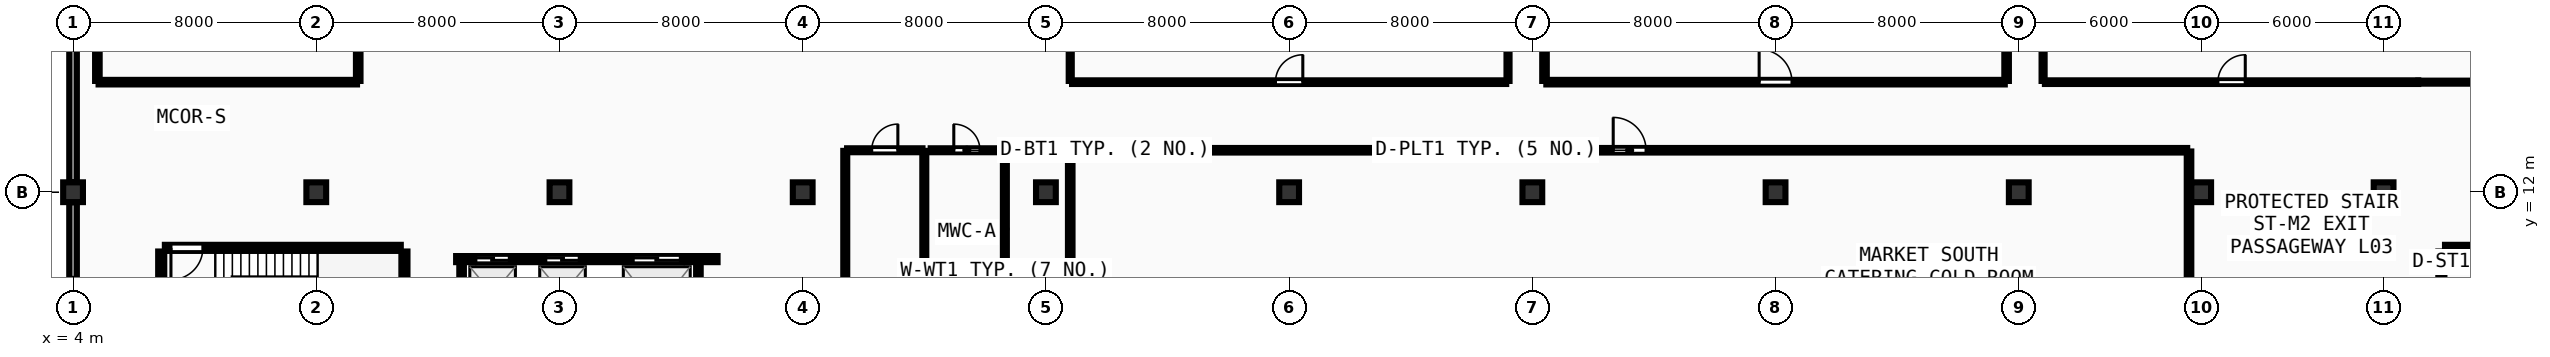
"""IFC4 building model, lengths in metres.
Left out: names, types, materials, properties, quantities, classifications, styles, units other than length and angle.
Written with IfcOpenShell. Run it as: python <this file> out.ifc"""

import sys

from ifc_helpers import new_model, si_unit, direction, frame, frame_2d, origin, origin_2d, place, context, subcontext, project, spatial, rectangle, extrude, element, fill, save


model = new_model("IFC4")
c1 = context("Model", 3, precision=1e-05, world=origin(), true_north=direction((0.0, 1.0)))
c2 = subcontext(c1, "Body", "Model", "MODEL_VIEW")
j1 = project(units=[si_unit("LENGTHUNIT", "METRE"), si_unit("PLANEANGLEUNIT", "RADIAN")], contexts=[c1])
p1 = place(None, origin())
s1 = spatial("IfcSite", under=j1, at=p1, CompositionType="ELEMENT")
p2 = place(p1, origin())
s2 = spatial("IfcBuilding", under=s1, at=p2, CompositionType="ELEMENT")
p3 = place(p2, frame((0.0, 0.0, 13.5)))
s3 = spatial("IfcBuildingStorey", under=s2, at=p3, CompositionType="ELEMENT", Elevation=13.5)
for number, where, z_axis, x_axis in (
    (1, (4.0, 12.0, 0.0), (0.0, 0.0, 1.0), (1.0, 0.0, 0.0)),
    (2, (12.0, 12.0, 0.0), (0.0, 0.0, 1.0), (1.0, 0.0, 0.0)),
    (3, (20.0, 12.0, 0.0), (0.0, 0.0, 1.0), (1.0, 0.0, 0.0)),
    (4, (28.0, 12.0, 0.0), (0.0, 0.0, 1.0), (1.0, 0.0, 0.0)),
    (5, (36.0, 12.0, 0.0), (0.0, 0.0, 1.0), (1.0, 0.0, 0.0)),
    (6, (44.0, 12.0, 0.0), (0.0, 0.0, 1.0), (1.0, 0.0, 0.0)),
    (7, (52.0, 12.0, 0.0), (0.0, 0.0, 1.0), (1.0, 0.0, 0.0)),
    (8, (60.0, 12.0, 0.0), (0.0, 0.0, 1.0), (1.0, 0.0, 0.0)),
    (9, (68.0, 12.0, 0.0), (0.0, 0.0, 1.0), (1.0, 0.0, 0.0)),
    (10, (74.0, 12.0, 0.0), (0.0, 0.0, 1.0), (1.0, 0.0, 0.0)),
    (11, (80.0, 12.0, 0.0), (0.0, 0.0, 1.0), (1.0, 0.0, 0.0)),
):
    element("IfcColumn", number, at=place(p3, frame(where, z_axis=z_axis, x_axis=x_axis)), inside=s3, PredefinedType="COLUMN", context=c2, shape_type="SweptSolid", body=[
        extrude(rectangle(XDim=0.65, YDim=0.65, at=origin_2d()), origin(), (0.0, 0.0, 1.0), 4.5),
    ])
p4 = place(p3, frame((4.0, 19.67, 0.0), z_axis=(0.0, 0.0, 1.0), x_axis=(0.0, -1.0, 0.0)))
e12 = element("IfcWall", 12, at=p4, inside=s3, PredefinedType="SOLIDWALL", context=c2, shape_type="SweptSolid", body=[
    extrude(rectangle(XDim=7.34, YDim=0.25, at=frame_2d((3.67, 0.0))), origin(), (0.0, 0.0, 1.0), 3.42),
])
p5 = place(p3, frame((4.0, 11.67, 0.0), z_axis=(0.0, 0.0, 1.0), x_axis=(0.0, -1.0, 0.0)))
e13 = element("IfcWall", 13, at=p5, inside=s3, PredefinedType="SOLIDWALL", context=c2, shape_type="SweptSolid", body=[
    extrude(rectangle(XDim=7.34, YDim=0.25, at=frame_2d((3.67, 0.0))), origin(), (0.0, 0.0, 1.0), 3.42),
])
p6 = place(p5, frame((2.47, 0.0, 0.95)))
e14 = element("IfcOpeningElement", 14, at=p6, cuts=e13, PredefinedType="OPENING", context=c2, shape_type="SweptSolid", body=[
    extrude(rectangle(XDim=2.4, YDim=1.65, at=frame_2d((1.2, 0.825))), frame((0.0, 0.135, 0.0), z_axis=(0.0, -1.0, 0.0), x_axis=(1.0, 0.0, 0.0)), (0.0, 0.0, 1.0), 0.27),
])
p7 = place(p3, frame((14.9, 6.58, 0.0), z_axis=(0.0, 0.0, 1.0), x_axis=(0.0, 1.0, 0.0)))
e15 = element("IfcWall", 15, at=p7, inside=s3, PredefinedType="SHEAR", context=c2, shape_type="SweptSolid", body=[
    extrude(rectangle(XDim=3.47, YDim=0.2, at=frame_2d((1.735, 0.0))), origin(), (0.0, 0.0, 1.0), 4.24),
])
p8 = place(p3, frame((14.78, 10.17, 0.0), z_axis=(0.0, 0.0, 1.0), x_axis=(-1.0, 0.0, 0.0)))
e16 = element("IfcWall", 16, at=p8, inside=s3, PredefinedType="SHEAR", context=c2, shape_type="SweptSolid", body=[
    extrude(rectangle(XDim=7.76, YDim=0.2, at=frame_2d((3.88, 0.0))), origin(), (0.0, 0.0, 1.0), 4.24),
])
p9 = place(p8, frame((6.51, 0.0, 0.0)))
e17 = element("IfcOpeningElement", 17, at=p9, cuts=e16, PredefinedType="OPENING", context=c2, shape_type="SweptSolid", body=[
    extrude(rectangle(XDim=1.05, YDim=2.1, at=frame_2d((0.525, 1.05))), frame((0.0, 0.11, 0.0), z_axis=(0.0, -1.0, 0.0), x_axis=(1.0, 0.0, 0.0)), (0.0, 0.0, 1.0), 0.22),
])
p10 = place(p3, frame((6.9, 10.05, 0.0), z_axis=(0.0, 0.0, 1.0), x_axis=(0.0, -1.0, 0.0)))
e18 = element("IfcWall", 18, at=p10, inside=s3, PredefinedType="SHEAR", context=c2, shape_type="SweptSolid", body=[
    extrude(rectangle(XDim=3.47, YDim=0.2, at=frame_2d((1.735, 0.0))), origin(), (0.0, 0.0, 1.0), 4.24),
])
p11 = place(p3, frame((89.78, 10.17, 0.0), z_axis=(0.0, 0.0, 1.0), x_axis=(-1.0, 0.0, 0.0)))
e19 = element("IfcWall", 19, at=p11, inside=s3, PredefinedType="SHEAR", context=c2, shape_type="SweptSolid", body=[
    extrude(rectangle(XDim=7.76, YDim=0.2, at=frame_2d((3.88, 0.0))), origin(), (0.0, 0.0, 1.0), 4.24),
])
p12 = place(p3, frame((81.9, 10.05, 0.0), z_axis=(0.0, 0.0, 1.0), x_axis=(0.0, -1.0, 0.0)))
e20 = element("IfcWall", 20, at=p12, inside=s3, PredefinedType="SHEAR", context=c2, shape_type="SweptSolid", body=[
    extrude(rectangle(XDim=3.47, YDim=0.2, at=frame_2d((1.735, 0.0))), origin(), (0.0, 0.0, 1.0), 4.24),
])
p13 = place(p12, frame((1.21, 0.0, 0.0)))
e21 = element("IfcOpeningElement", 21, at=p13, cuts=e20, PredefinedType="OPENING", context=c2, shape_type="SweptSolid", body=[
    extrude(rectangle(XDim=1.05, YDim=2.1, at=frame_2d((0.525, 1.05))), frame((0.0, 0.11, 0.0), z_axis=(0.0, -1.0, 0.0), x_axis=(1.0, 0.0, 0.0)), (0.0, 0.0, 1.0), 0.22),
])
p14 = place(p3, frame((16.6, 9.8, 0.0), z_axis=(0.0, 0.0, 1.0), x_axis=(1.0, 0.0, 0.0)))
e22 = element("IfcWall", 22, at=p14, inside=s3, PredefinedType="SOLIDWALL", context=c2, shape_type="SweptSolid", body=[
    extrude(rectangle(XDim=8.6, YDim=0.2, at=frame_2d((4.3, 0.0))), origin(), (0.0, 0.0, 1.0), 3.425),
])
p15 = place(p14, frame((0.65, 0.0, 0.0)))
e23 = element("IfcOpeningElement", 23, at=p15, cuts=e22, PredefinedType="OPENING", context=c2, shape_type="SweptSolid", body=[
    extrude(rectangle(XDim=1.1, YDim=2.1, at=frame_2d((0.55, 1.05))), frame((0.0, 0.11, 0.0), z_axis=(0.0, -1.0, 0.0), x_axis=(1.0, 0.0, 0.0)), (0.0, 0.0, 1.0), 0.22),
])
p16 = place(p14, frame((2.95, 0.0, 0.0)))
e24 = element("IfcOpeningElement", 24, at=p16, cuts=e22, PredefinedType="OPENING", context=c2, shape_type="SweptSolid", body=[
    extrude(rectangle(XDim=1.1, YDim=2.1, at=frame_2d((0.55, 1.05))), frame((0.0, 0.11, 0.0), z_axis=(0.0, -1.0, 0.0), x_axis=(1.0, 0.0, 0.0)), (0.0, 0.0, 1.0), 0.22),
])
p17 = place(p14, frame((5.825, 0.0, 0.0)))
e25 = element("IfcOpeningElement", 25, at=p17, cuts=e22, PredefinedType="OPENING", context=c2, shape_type="SweptSolid", body=[
    extrude(rectangle(XDim=1.55, YDim=2.2, at=frame_2d((0.775, 1.1))), frame((0.0, 0.11, 0.0), z_axis=(0.0, -1.0, 0.0), x_axis=(1.0, 0.0, 0.0)), (0.0, 0.0, 1.0), 0.22),
])
for number, where, z_axis, x_axis in (
    (26, (16.78, 6.76, 0.0), (0.0, 0.0, 1.0), (0.0, 1.0, 0.0)),
    (27, (24.57, 6.76, 0.0), (0.0, 0.0, 1.0), (0.0, 1.0, 0.0)),
):
    element("IfcWall", number, at=place(p3, frame(where, z_axis=z_axis, x_axis=x_axis)), inside=s3, PredefinedType="PARTITIONING", context=c2, shape_type="SweptSolid", body=[
        extrude(rectangle(XDim=2.91, YDim=0.15, at=frame_2d((1.455, 0.0))), origin(), (0.0, 0.0, 1.0), 4.23),
    ])
p18 = place(p3, frame((29.46, 13.38, 0.0), z_axis=(0.0, 0.0, 1.0), x_axis=(1.0, 0.0, 0.0)))
e28 = element("IfcWall", 28, at=p18, inside=s3, PredefinedType="PLUMBINGWALL", context=c2, shape_type="SweptSolid", body=[
    extrude(rectangle(XDim=2.48, YDim=0.13, at=frame_2d((1.24, 0.0))), origin(), (0.0, 0.0, 1.0), 4.09),
])
p19 = place(p18, frame((0.81, 0.0, 0.0)))
e29 = element("IfcOpeningElement", 29, at=p19, cuts=e28, PredefinedType="OPENING", context=c2, shape_type="SweptSolid", body=[
    extrude(rectangle(XDim=0.86, YDim=2.05, at=frame_2d((0.43, 1.025))), frame((0.0, 0.075, 0.0), z_axis=(0.0, -1.0, 0.0), x_axis=(1.0, 0.0, 0.0)), (0.0, 0.0, 1.0), 0.15),
])
p20 = place(p3, frame((32.21, 13.38, 0.0), z_axis=(0.0, 0.0, 1.0), x_axis=(1.0, 0.0, 0.0)))
e30 = element("IfcWall", 30, at=p20, inside=s3, PredefinedType="PLUMBINGWALL", context=c2, shape_type="SweptSolid", body=[
    extrude(rectangle(XDim=2.38, YDim=0.13, at=frame_2d((1.19, 0.0))), origin(), (0.0, 0.0, 1.0), 4.09),
])
p21 = place(p20, frame((0.76, 0.0, 0.0)))
e31 = element("IfcOpeningElement", 31, at=p21, cuts=e30, PredefinedType="OPENING", context=c2, shape_type="SweptSolid", body=[
    extrude(rectangle(XDim=0.86, YDim=2.05, at=frame_2d((0.43, 1.025))), frame((0.0, 0.075, 0.0), z_axis=(0.0, -1.0, 0.0), x_axis=(1.0, 0.0, 0.0)), (0.0, 0.0, 1.0), 0.15),
])
p22 = place(p3, frame((36.86, 15.62, 0.0), z_axis=(0.0, 0.0, 1.0), x_axis=(1.0, 0.0, 0.0)))
e32 = element("IfcWall", 32, at=p22, inside=s3, PredefinedType="PARTITIONING", context=c2, shape_type="SweptSolid", body=[
    extrude(rectangle(XDim=14.28, YDim=0.12, at=frame_2d((7.14, 0.0))), origin(), (0.0, 0.0, 1.0), 3.425),
])
p23 = place(p22, frame((6.69, 0.0, 0.0)))
e33 = element("IfcOpeningElement", 33, at=p23, cuts=e32, PredefinedType="OPENING", context=c2, shape_type="SweptSolid", body=[
    extrude(rectangle(XDim=0.9, YDim=2.08, at=frame_2d((0.45, 1.04))), frame((0.0, 0.07, 0.0), z_axis=(0.0, -1.0, 0.0), x_axis=(1.0, 0.0, 0.0)), (0.0, 0.0, 1.0), 0.14),
])
p24 = place(p3, frame((52.46, 15.62, 0.0), z_axis=(0.0, 0.0, 1.0), x_axis=(1.0, 0.0, 0.0)))
e34 = element("IfcWall", 34, at=p24, inside=s3, PredefinedType="PARTITIONING", context=c2, shape_type="SweptSolid", body=[
    extrude(rectangle(XDim=15.08, YDim=0.15, at=frame_2d((7.54, 0.0))), origin(), (0.0, 0.0, 1.0), 3.425),
])
p25 = place(p24, frame((7.0, 0.0, 0.0)))
e35 = element("IfcOpeningElement", 35, at=p25, cuts=e34, PredefinedType="OPENING", context=c2, shape_type="SweptSolid", body=[
    extrude(rectangle(XDim=1.08, YDim=2.1, at=frame_2d((0.54, 1.05))), frame((0.0, 0.085, 0.0), z_axis=(0.0, -1.0, 0.0), x_axis=(1.0, 0.0, 0.0)), (0.0, 0.0, 1.0), 0.17),
])
p26 = place(p3, frame((68.86, 15.62, 0.0), z_axis=(0.0, 0.0, 1.0), x_axis=(1.0, 0.0, 0.0)))
e36 = element("IfcWall", 36, at=p26, inside=s3, PredefinedType="PARTITIONING", context=c2, shape_type="SweptSolid", body=[
    extrude(rectangle(XDim=12.28, YDim=0.12, at=frame_2d((6.14, 0.0))), origin(), (0.0, 0.0, 1.0), 3.425),
])
p27 = place(p26, frame((5.69, 0.0, 0.0)))
e37 = element("IfcOpeningElement", 37, at=p27, cuts=e36, PredefinedType="OPENING", context=c2, shape_type="SweptSolid", body=[
    extrude(rectangle(XDim=0.9, YDim=2.08, at=frame_2d((0.45, 1.04))), frame((0.0, 0.07, 0.0), z_axis=(0.0, -1.0, 0.0), x_axis=(1.0, 0.0, 0.0)), (0.0, 0.0, 1.0), 0.14),
])
p28 = place(p3, frame((36.86, 13.38, 0.0), z_axis=(0.0, 0.0, 1.0), x_axis=(1.0, 0.0, 0.0)))
e38 = element("IfcWall", 38, at=p28, inside=s3, PredefinedType="PARTITIONING", context=c2, shape_type="SweptSolid", body=[
    extrude(rectangle(XDim=36.68, YDim=0.15, at=frame_2d((18.34, 0.0))), origin(), (0.0, 0.0, 1.0), 3.425),
])
p29 = place(p28, frame((17.8, 0.0, 0.0)))
e39 = element("IfcOpeningElement", 39, at=p29, cuts=e38, PredefinedType="OPENING", context=c2, shape_type="SweptSolid", body=[
    extrude(rectangle(XDim=1.08, YDim=2.1, at=frame_2d((0.54, 1.05))), frame((0.0, 0.085, 0.0), z_axis=(0.0, -1.0, 0.0), x_axis=(1.0, 0.0, 0.0)), (0.0, 0.0, 1.0), 0.17),
])
for number, where, z_axis, x_axis in (
    (40, (32.0, 5.22, 0.0), (0.0, 0.0, 1.0), (0.0, 1.0, 0.0)),
    (41, (29.4, 13.36, 0.0), (0.0, 0.0, 1.0), (0.0, -1.0, 0.0)),
):
    element("IfcWall", number, at=place(p3, frame(where, z_axis=z_axis, x_axis=x_axis)), inside=s3, PredefinedType="PLUMBINGWALL", context=c2, shape_type="SweptSolid", body=[
        extrude(rectangle(XDim=8.14, YDim=0.13, at=frame_2d((4.07, 0.0))), origin(), (0.0, 0.0, 1.0), 3.425),
    ])
p30 = place(p3, frame((34.65, 8.22, 0.0), z_axis=(0.0, 0.0, 1.0), x_axis=(0.0, 1.0, 0.0)))
e42 = element("IfcWall", 42, at=p30, inside=s3, PredefinedType="PLUMBINGWALL", context=c2, shape_type="SweptSolid", body=[
    extrude(rectangle(XDim=5.14, YDim=0.13, at=frame_2d((2.57, 0.0))), origin(), (0.0, 0.0, 1.0), 3.425),
])
for number, where, z_axis, x_axis in (
    (43, (51.2, 15.66, 0.0), (0.0, 0.0, 1.0), (0.0, 1.0, 0.0)),
    (44, (36.8, 25.16, 0.0), (0.0, 0.0, 1.0), (0.0, -1.0, 0.0)),
):
    element("IfcWall", number, at=place(p3, frame(where, z_axis=z_axis, x_axis=x_axis)), inside=s3, PredefinedType="PARTITIONING", context=c2, shape_type="SweptSolid", body=[
        extrude(rectangle(XDim=9.5, YDim=0.1, at=frame_2d((4.75, 0.0))), origin(), (0.0, 0.0, 1.0), 3.425),
    ])
for number, where, z_axis, x_axis in (
    (45, (67.6, 15.66, 0.0), (0.0, 0.0, 1.0), (0.0, 1.0, 0.0)),
    (46, (52.4, 25.16, 0.0), (0.0, 0.0, 1.0), (0.0, -1.0, 0.0)),
):
    element("IfcWall", number, at=place(p3, frame(where, z_axis=z_axis, x_axis=x_axis)), inside=s3, PredefinedType="PARTITIONING", context=c2, shape_type="SweptSolid", body=[
        extrude(rectangle(XDim=9.5, YDim=0.15, at=frame_2d((4.75, 0.0))), origin(), (0.0, 0.0, 1.0), 3.425),
    ])
p31 = place(p3, frame((81.14, 15.62, 0.0), z_axis=(0.0, 0.0, 1.0), x_axis=(1.0, 0.0, 0.0)))
e47 = element("IfcWall", 47, at=p31, inside=s3, PredefinedType="PARTITIONING", context=c2, shape_type="SweptSolid", body=[
    extrude(rectangle(XDim=14.02, YDim=0.1, at=frame_2d((7.01, 0.0))), origin(), (0.0, 0.0, 1.0), 3.425),
])
p32 = place(p3, frame((68.8, 25.16, 0.0), z_axis=(0.0, 0.0, 1.0), x_axis=(0.0, -1.0, 0.0)))
e48 = element("IfcWall", 48, at=p32, inside=s3, PredefinedType="PARTITIONING", context=c2, shape_type="SweptSolid", body=[
    extrude(rectangle(XDim=9.5, YDim=0.1, at=frame_2d((4.75, 0.0))), origin(), (0.0, 0.0, 1.0), 3.425),
])
for number, where, z_axis, x_axis in (
    (49, (73.6, 4.84, 0.0), (0.0, 0.0, 1.0), (0.0, 1.0, 0.0)),
    (50, (36.8, 13.34, 0.0), (0.0, 0.0, 1.0), (0.0, -1.0, 0.0)),
    (51, (4.84, 15.62, 0.0), (0.0, 0.0, 1.0), (1.0, 0.0, 0.0)),
):
    element("IfcWall", number, at=place(p3, frame(where, z_axis=z_axis, x_axis=x_axis)), inside=s3, PredefinedType="PARTITIONING", context=c2, shape_type="SweptSolid", body=[
        extrude(rectangle(XDim=8.5, YDim=0.15, at=frame_2d((4.25, 0.0))), origin(), (0.0, 0.0, 1.0), 3.425),
    ])
p33 = place(p3, frame((13.38, 15.66, 0.0), z_axis=(0.0, 0.0, 1.0), x_axis=(0.0, 1.0, 0.0)))
e52 = element("IfcWall", 52, at=p33, inside=s3, PredefinedType="PARTITIONING", context=c2, shape_type="SweptSolid", body=[
    extrude(rectangle(XDim=5.8, YDim=0.15, at=frame_2d((2.9, 0.0))), origin(), (0.0, 0.0, 1.0), 3.425),
])
p34 = place(p3, frame((4.8, 65.16, 0.0), z_axis=(0.0, 0.0, 1.0), x_axis=(0.0, -1.0, 0.0)))
e53 = element("IfcWall", 53, at=p34, inside=s3, PredefinedType="PARTITIONING", context=c2, shape_type="SweptSolid", body=[
    extrude(rectangle(XDim=49.5, YDim=0.15, at=frame_2d((24.75, 0.0))), origin(), (0.0, 0.0, 1.0), 3.425),
])
p35 = place(p9, origin())
e54 = element("IfcDoor", 54, at=p35, inside=s3, OperationType="SINGLE_SWING_RIGHT", PredefinedType="DOOR", context=c2, shape_type="SweptSolid", body=[
    extrude(rectangle(XDim=1.05, YDim=2.1, at=frame_2d((0.525, 1.05))), frame((0.0, 0.025, 0.0), z_axis=(0.0, -1.0, 0.0), x_axis=(1.0, 0.0, 0.0)), (0.0, 0.0, 1.0), 0.05),
])
fill(e17, e54)
p36 = place(p15, origin())
e55 = element("IfcDoor", 55, at=p36, inside=s3, OperationType="DOUBLE_DOOR_SLIDING", PredefinedType="DOOR", context=c2, shape_type="SweptSolid", body=[
    extrude(rectangle(XDim=1.1, YDim=2.1, at=frame_2d((0.55, 1.05))), frame((0.0, 0.025, 0.0), z_axis=(0.0, -1.0, 0.0), x_axis=(1.0, 0.0, 0.0)), (0.0, 0.0, 1.0), 0.05),
])
fill(e23, e55)
p37 = place(p16, origin())
e56 = element("IfcDoor", 56, at=p37, inside=s3, OperationType="DOUBLE_DOOR_SLIDING", PredefinedType="DOOR", context=c2, shape_type="SweptSolid", body=[
    extrude(rectangle(XDim=1.1, YDim=2.1, at=frame_2d((0.55, 1.05))), frame((0.0, 0.025, 0.0), z_axis=(0.0, -1.0, 0.0), x_axis=(1.0, 0.0, 0.0)), (0.0, 0.0, 1.0), 0.05),
])
fill(e24, e56)
p38 = place(p17, origin())
e57 = element("IfcDoor", 57, at=p38, inside=s3, OperationType="DOUBLE_DOOR_SLIDING", PredefinedType="DOOR", context=c2, shape_type="SweptSolid", body=[
    extrude(rectangle(XDim=1.55, YDim=2.2, at=frame_2d((0.775, 1.1))), frame((0.0, 0.025, 0.0), z_axis=(0.0, -1.0, 0.0), x_axis=(1.0, 0.0, 0.0)), (0.0, 0.0, 1.0), 0.05),
])
fill(e25, e57)
p39 = place(p19, origin())
e58 = element("IfcDoor", 58, at=p39, inside=s3, OperationType="SINGLE_SWING_RIGHT", PredefinedType="DOOR", context=c2, shape_type="SweptSolid", body=[
    extrude(rectangle(XDim=0.86, YDim=2.05, at=frame_2d((0.43, 1.025))), frame((0.0, 0.025, 0.0), z_axis=(0.0, -1.0, 0.0), x_axis=(1.0, 0.0, 0.0)), (0.0, 0.0, 1.0), 0.05),
])
fill(e29, e58)
p40 = place(p21, origin())
e59 = element("IfcDoor", 59, at=p40, inside=s3, OperationType="SINGLE_SWING_LEFT", PredefinedType="DOOR", context=c2, shape_type="SweptSolid", body=[
    extrude(rectangle(XDim=0.86, YDim=2.05, at=frame_2d((0.43, 1.025))), frame((0.0, 0.025, 0.0), z_axis=(0.0, -1.0, 0.0), x_axis=(1.0, 0.0, 0.0)), (0.0, 0.0, 1.0), 0.05),
])
fill(e31, e59)
p41 = place(p23, origin())
e60 = element("IfcDoor", 60, at=p41, inside=s3, OperationType="SINGLE_SWING_RIGHT", PredefinedType="DOOR", context=c2, shape_type="SweptSolid", body=[
    extrude(rectangle(XDim=0.9, YDim=2.08, at=frame_2d((0.45, 1.04))), frame((0.0, 0.025, 0.0), z_axis=(0.0, -1.0, 0.0), x_axis=(1.0, 0.0, 0.0)), (0.0, 0.0, 1.0), 0.05),
])
fill(e33, e60)
p42 = place(p25, origin())
e61 = element("IfcDoor", 61, at=p42, inside=s3, OperationType="SINGLE_SWING_LEFT", PredefinedType="DOOR", context=c2, shape_type="SweptSolid", body=[
    extrude(rectangle(XDim=1.08, YDim=2.1, at=frame_2d((0.54, 1.05))), frame((0.0, 0.025, 0.0), z_axis=(0.0, -1.0, 0.0), x_axis=(1.0, 0.0, 0.0)), (0.0, 0.0, 1.0), 0.05),
])
fill(e35, e61)
p43 = place(p27, origin())
e62 = element("IfcDoor", 62, at=p43, inside=s3, OperationType="SINGLE_SWING_RIGHT", PredefinedType="DOOR", context=c2, shape_type="SweptSolid", body=[
    extrude(rectangle(XDim=0.9, YDim=2.08, at=frame_2d((0.45, 1.04))), frame((0.0, 0.025, 0.0), z_axis=(0.0, -1.0, 0.0), x_axis=(1.0, 0.0, 0.0)), (0.0, 0.0, 1.0), 0.05),
])
fill(e37, e62)
p44 = place(p29, origin())
e63 = element("IfcDoor", 63, at=p44, inside=s3, OperationType="SINGLE_SWING_LEFT", PredefinedType="DOOR", context=c2, shape_type="SweptSolid", body=[
    extrude(rectangle(XDim=1.08, YDim=2.1, at=frame_2d((0.54, 1.05))), frame((0.0, 0.025, 0.0), z_axis=(0.0, -1.0, 0.0), x_axis=(1.0, 0.0, 0.0)), (0.0, 0.0, 1.0), 0.05),
])
fill(e39, e63)
save(model, sys.argv[1])
